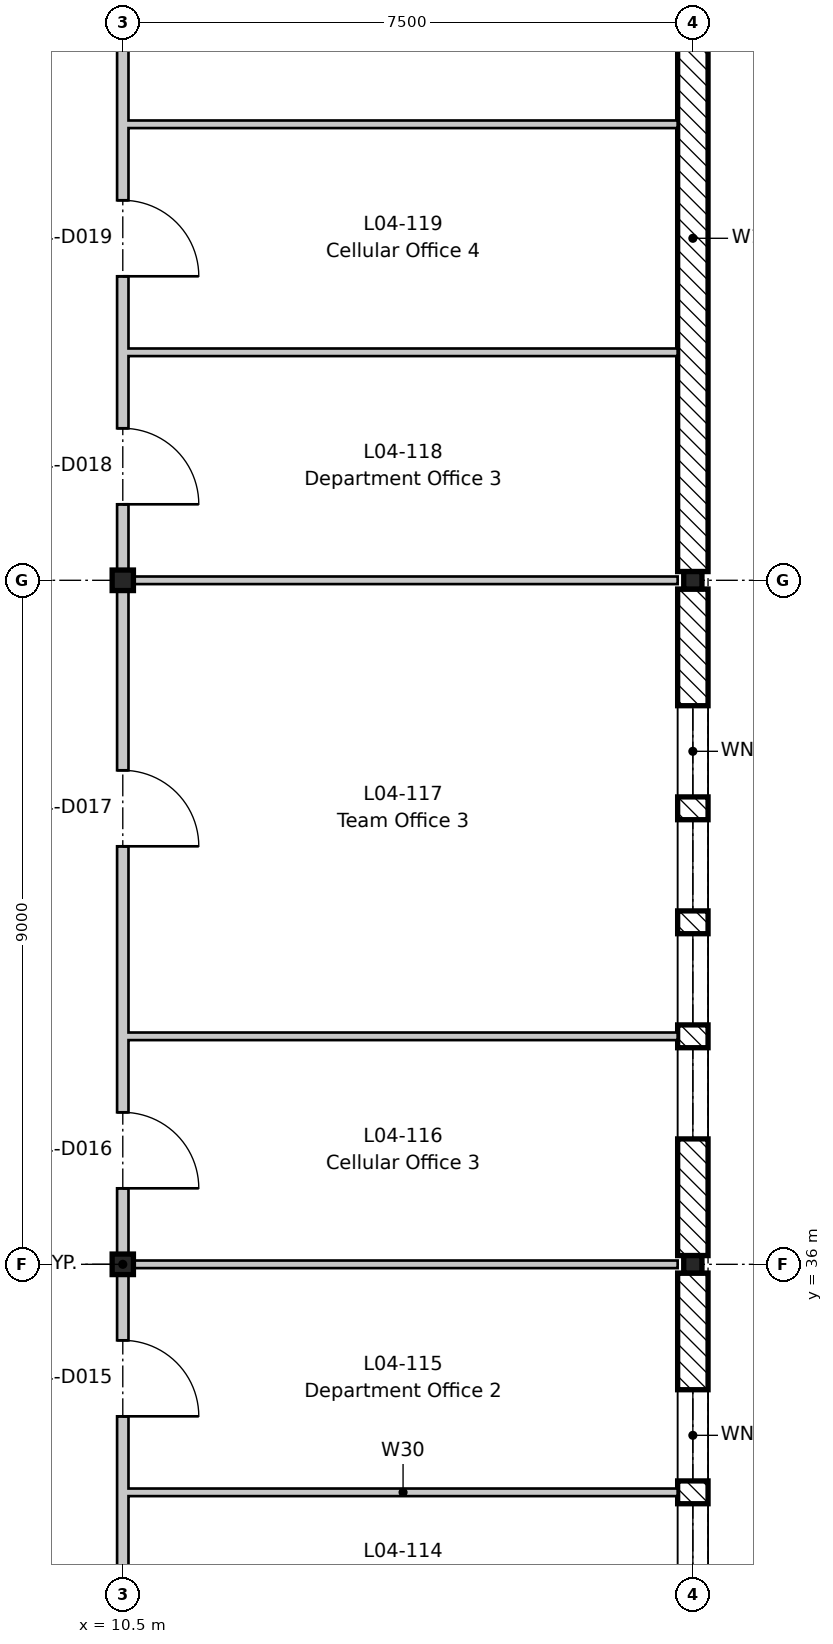
"""IFC4 building model, lengths in metres.
Left out: names, types, materials, properties, quantities, classifications, styles, units other than length and angle.
Written with IfcOpenShell. Run it as: python <this file> out.ifc"""

import sys

from ifc_helpers import new_model, si_unit, direction, frame, frame_2d, origin, origin_2d, place, context, subcontext, project, spatial, rectangle, i_section, extrude, element, fill, save


model = new_model("IFC4")
c1 = context("Model", 3, precision=1e-05, world=origin(), true_north=direction((0.0, 1.0)))
c2 = subcontext(c1, "Body", "Model", "MODEL_VIEW")
j1 = project(units=[si_unit("LENGTHUNIT", "METRE"), si_unit("PLANEANGLEUNIT", "RADIAN")], contexts=[c1])
p1 = place(None, origin())
s1 = spatial("IfcSite", under=j1, at=p1, CompositionType="ELEMENT")
p2 = place(p1, origin())
s2 = spatial("IfcBuilding", under=s1, at=p2, CompositionType="ELEMENT")
p3 = place(p2, frame((0.0, 0.0, 18.6)))
s3 = spatial("IfcBuildingStorey", under=s2, at=p3, CompositionType="ELEMENT", Elevation=18.6)
for number, where, z_axis, x_axis in (
    (1, (10.5, 36.0, -0.2), (0.0, 0.0, 1.0), (1.0, 0.0, 0.0)),
    (2, (10.5, 45.0, -0.2), (0.0, 0.0, 1.0), (1.0, 0.0, 0.0)),
):
    element("IfcColumn", number, at=place(p3, frame(where, z_axis=z_axis, x_axis=x_axis)), inside=s3, PredefinedType="COLUMN", context=c2, shape_type="SweptSolid", body=[
        extrude(i_section(OverallWidth=0.28, OverallDepth=0.27, WebThickness=0.008, FlangeThickness=0.013, FilletRadius=0.024, at=origin_2d()), origin(), (0.0, 0.0, 1.0), 4.2),
    ])
for number, where, z_axis, x_axis in (
    (3, (18.0, 36.0, -0.2), (0.0, 0.0, 1.0), (1.0, 0.0, 0.0)),
    (4, (18.0, 45.0, -0.2), (0.0, 0.0, 1.0), (1.0, 0.0, 0.0)),
):
    element("IfcColumn", number, at=place(p3, frame(where, z_axis=z_axis, x_axis=x_axis)), inside=s3, PredefinedType="COLUMN", context=c2, shape_type="SweptSolid", body=[
        extrude(i_section(OverallWidth=0.24, OverallDepth=0.23, WebThickness=0.008, FlangeThickness=0.012, FilletRadius=0.021, at=origin_2d()), origin(), (0.0, 0.0, 1.0), 4.2),
    ])
p4 = place(p3, frame((18.0, 35.885, 0.0), z_axis=(0.0, 0.0, 1.0), x_axis=(0.0, -1.0, 0.0)))
e5 = element("IfcWall", 5, at=p4, inside=s3, PredefinedType="STANDARD", context=c2, shape_type="SweptSolid", body=[
    extrude(rectangle(XDim=8.77, YDim=0.4, at=frame_2d((4.385, 0.0))), origin(), (0.0, 0.0, 1.0), 3.6),
])
p5 = place(p4, frame((6.035, 0.0, 0.6)))
e6 = element("IfcOpeningElement", 6, at=p5, cuts=e5, PredefinedType="OPENING", context=c2, shape_type="SweptSolid", body=[
    extrude(rectangle(XDim=1.2, YDim=2.7, at=frame_2d((0.6, 1.35))), frame((0.0, 0.21, 0.0), z_axis=(0.0, -1.0, 0.0), x_axis=(1.0, 0.0, 0.0)), (0.0, 0.0, 1.0), 0.42),
])
p6 = place(p4, frame((4.535, 0.0, 0.6)))
e7 = element("IfcOpeningElement", 7, at=p6, cuts=e5, PredefinedType="OPENING", context=c2, shape_type="SweptSolid", body=[
    extrude(rectangle(XDim=1.2, YDim=2.7, at=frame_2d((0.6, 1.35))), frame((0.0, 0.21, 0.0), z_axis=(0.0, -1.0, 0.0), x_axis=(1.0, 0.0, 0.0)), (0.0, 0.0, 1.0), 0.42),
])
p7 = place(p4, frame((3.035, 0.0, 0.6)))
e8 = element("IfcOpeningElement", 8, at=p7, cuts=e5, PredefinedType="OPENING", context=c2, shape_type="SweptSolid", body=[
    extrude(rectangle(XDim=1.2, YDim=2.7, at=frame_2d((0.6, 1.35))), frame((0.0, 0.21, 0.0), z_axis=(0.0, -1.0, 0.0), x_axis=(1.0, 0.0, 0.0)), (0.0, 0.0, 1.0), 0.42),
])
p8 = place(p4, frame((1.535, 0.0, 0.6)))
e9 = element("IfcOpeningElement", 9, at=p8, cuts=e5, PredefinedType="OPENING", context=c2, shape_type="SweptSolid", body=[
    extrude(rectangle(XDim=1.2, YDim=2.7, at=frame_2d((0.6, 1.35))), frame((0.0, 0.21, 0.0), z_axis=(0.0, -1.0, 0.0), x_axis=(1.0, 0.0, 0.0)), (0.0, 0.0, 1.0), 0.42),
])
p9 = place(p3, frame((18.0, 44.885, 0.0), z_axis=(0.0, 0.0, 1.0), x_axis=(0.0, -1.0, 0.0)))
e10 = element("IfcWall", 10, at=p9, inside=s3, PredefinedType="STANDARD", context=c2, shape_type="SweptSolid", body=[
    extrude(rectangle(XDim=8.77, YDim=0.4, at=frame_2d((4.385, 0.0))), origin(), (0.0, 0.0, 1.0), 3.6),
])
p10 = place(p9, frame((6.035, 0.0, 0.6)))
e11 = element("IfcOpeningElement", 11, at=p10, cuts=e10, PredefinedType="OPENING", context=c2, shape_type="SweptSolid", body=[
    extrude(rectangle(XDim=1.2, YDim=2.7, at=frame_2d((0.6, 1.35))), frame((0.0, 0.21, 0.0), z_axis=(0.0, -1.0, 0.0), x_axis=(1.0, 0.0, 0.0)), (0.0, 0.0, 1.0), 0.42),
])
p11 = place(p9, frame((4.535, 0.0, 0.6)))
e12 = element("IfcOpeningElement", 12, at=p11, cuts=e10, PredefinedType="OPENING", context=c2, shape_type="SweptSolid", body=[
    extrude(rectangle(XDim=1.2, YDim=2.7, at=frame_2d((0.6, 1.35))), frame((0.0, 0.21, 0.0), z_axis=(0.0, -1.0, 0.0), x_axis=(1.0, 0.0, 0.0)), (0.0, 0.0, 1.0), 0.42),
])
p12 = place(p9, frame((3.035, 0.0, 0.6)))
e13 = element("IfcOpeningElement", 13, at=p12, cuts=e10, PredefinedType="OPENING", context=c2, shape_type="SweptSolid", body=[
    extrude(rectangle(XDim=1.2, YDim=2.7, at=frame_2d((0.6, 1.35))), frame((0.0, 0.21, 0.0), z_axis=(0.0, -1.0, 0.0), x_axis=(1.0, 0.0, 0.0)), (0.0, 0.0, 1.0), 0.42),
])
p13 = place(p9, frame((1.535, 0.0, 0.6)))
e14 = element("IfcOpeningElement", 14, at=p13, cuts=e10, PredefinedType="OPENING", context=c2, shape_type="SweptSolid", body=[
    extrude(rectangle(XDim=1.2, YDim=2.7, at=frame_2d((0.6, 1.35))), frame((0.0, 0.21, 0.0), z_axis=(0.0, -1.0, 0.0), x_axis=(1.0, 0.0, 0.0)), (0.0, 0.0, 1.0), 0.42),
])
p14 = place(p3, frame((18.0, 53.885, 0.0), z_axis=(0.0, 0.0, 1.0), x_axis=(0.0, -1.0, 0.0)))
e15 = element("IfcWall", 15, at=p14, inside=s3, PredefinedType="STANDARD", context=c2, shape_type="SweptSolid", body=[
    extrude(rectangle(XDim=8.77, YDim=0.4, at=frame_2d((4.385, 0.0))), origin(), (0.0, 0.0, 1.0), 3.6),
])
p15 = place(p3, frame((10.575, 33.0, 0.0), z_axis=(0.0, 0.0, 1.0), x_axis=(1.0, 0.0, 0.0)))
e16 = element("IfcWall", 16, at=p15, inside=s3, PredefinedType="PARTITIONING", context=c2, shape_type="SweptSolid", body=[
    extrude(rectangle(XDim=7.225, YDim=0.1, at=frame_2d((3.613, 0.0))), origin(), (0.0, 0.0, 1.0), 4.0),
])
p16 = place(p3, frame((10.575, 36.0, 0.0), z_axis=(0.0, 0.0, 1.0), x_axis=(1.0, 0.0, 0.0)))
e17 = element("IfcWall", 17, at=p16, inside=s3, PredefinedType="PARTITIONING", context=c2, shape_type="SweptSolid", body=[
    extrude(rectangle(XDim=7.225, YDim=0.1, at=frame_2d((3.613, 0.0))), origin(), (0.0, 0.0, 1.0), 3.65),
])
p17 = place(p3, frame((10.575, 39.0, 0.0), z_axis=(0.0, 0.0, 1.0), x_axis=(1.0, 0.0, 0.0)))
e18 = element("IfcWall", 18, at=p17, inside=s3, PredefinedType="PARTITIONING", context=c2, shape_type="SweptSolid", body=[
    extrude(rectangle(XDim=7.225, YDim=0.1, at=frame_2d((3.613, 0.0))), origin(), (0.0, 0.0, 1.0), 4.0),
])
p18 = place(p3, frame((10.575, 45.0, 0.0), z_axis=(0.0, 0.0, 1.0), x_axis=(1.0, 0.0, 0.0)))
e19 = element("IfcWall", 19, at=p18, inside=s3, PredefinedType="PARTITIONING", context=c2, shape_type="SweptSolid", body=[
    extrude(rectangle(XDim=7.225, YDim=0.1, at=frame_2d((3.613, 0.0))), origin(), (0.0, 0.0, 1.0), 3.65),
])
for number, where, z_axis, x_axis in (
    (20, (10.575, 48.0, 0.0), (0.0, 0.0, 1.0), (1.0, 0.0, 0.0)),
    (21, (10.575, 51.0, 0.0), (0.0, 0.0, 1.0), (1.0, 0.0, 0.0)),
):
    element("IfcWall", number, at=place(p3, frame(where, z_axis=z_axis, x_axis=x_axis)), inside=s3, PredefinedType="PARTITIONING", context=c2, shape_type="SweptSolid", body=[
        extrude(rectangle(XDim=7.225, YDim=0.1, at=frame_2d((3.613, 0.0))), origin(), (0.0, 0.0, 1.0), 4.0),
    ])
p19 = place(p3, frame((10.5, -8.8, 0.0), z_axis=(0.0, 0.0, 1.0), x_axis=(0.0, 1.0, 0.0)))
e22 = element("IfcWall", 22, at=p19, inside=s3, PredefinedType="PARTITIONING", context=c2, shape_type="SweptSolid", body=[
    extrude(rectangle(XDim=79.3, YDim=0.15, at=frame_2d((39.65, 0.0))), origin(), (0.0, 0.0, 1.0), 3.48),
])
p20 = place(p19, frame((2.3, 0.0, 0.0)))
e23 = element("IfcOpeningElement", 23, at=p20, cuts=e22, PredefinedType="OPENING", context=c2, shape_type="SweptSolid", body=[
    extrude(rectangle(XDim=1.0, YDim=2.1, at=frame_2d((0.5, 1.05))), frame((0.0, 0.085, 0.0), z_axis=(0.0, -1.0, 0.0), x_axis=(1.0, 0.0, 0.0)), (0.0, 0.0, 1.0), 0.17),
])
p21 = place(p19, frame((9.55, 0.0, 0.0)))
e24 = element("IfcOpeningElement", 24, at=p21, cuts=e22, PredefinedType="OPENING", context=c2, shape_type="SweptSolid", body=[
    extrude(rectangle(XDim=1.0, YDim=2.1, at=frame_2d((0.5, 1.05))), frame((0.0, 0.085, 0.0), z_axis=(0.0, -1.0, 0.0), x_axis=(1.0, 0.0, 0.0)), (0.0, 0.0, 1.0), 0.17),
])
p22 = place(p19, frame((15.6, 0.0, 0.0)))
e25 = element("IfcOpeningElement", 25, at=p22, cuts=e22, PredefinedType="OPENING", context=c2, shape_type="SweptSolid", body=[
    extrude(rectangle(XDim=1.4, YDim=2.1, at=frame_2d((0.7, 1.05))), frame((0.0, 0.085, 0.0), z_axis=(0.0, -1.0, 0.0), x_axis=(1.0, 0.0, 0.0)), (0.0, 0.0, 1.0), 0.17),
])
p23 = place(p19, frame((21.8, 0.0, 0.0)))
e26 = element("IfcOpeningElement", 26, at=p23, cuts=e22, PredefinedType="OPENING", context=c2, shape_type="SweptSolid", body=[
    extrude(rectangle(XDim=1.0, YDim=2.1, at=frame_2d((0.5, 1.05))), frame((0.0, 0.085, 0.0), z_axis=(0.0, -1.0, 0.0), x_axis=(1.0, 0.0, 0.0)), (0.0, 0.0, 1.0), 0.17),
])
p24 = place(p19, frame((24.8, 0.0, 0.0)))
e27 = element("IfcOpeningElement", 27, at=p24, cuts=e22, PredefinedType="OPENING", context=c2, shape_type="SweptSolid", body=[
    extrude(rectangle(XDim=1.0, YDim=2.1, at=frame_2d((0.5, 1.05))), frame((0.0, 0.085, 0.0), z_axis=(0.0, -1.0, 0.0), x_axis=(1.0, 0.0, 0.0)), (0.0, 0.0, 1.0), 0.17),
])
p25 = place(p19, frame((30.6, 0.0, 0.0)))
e28 = element("IfcOpeningElement", 28, at=p25, cuts=e22, PredefinedType="OPENING", context=c2, shape_type="SweptSolid", body=[
    extrude(rectangle(XDim=1.4, YDim=2.1, at=frame_2d((0.7, 1.05))), frame((0.0, 0.085, 0.0), z_axis=(0.0, -1.0, 0.0), x_axis=(1.0, 0.0, 0.0)), (0.0, 0.0, 1.0), 0.17),
])
p26 = place(p19, frame((38.3, 0.0, 0.0)))
e29 = element("IfcOpeningElement", 29, at=p26, cuts=e22, PredefinedType="OPENING", context=c2, shape_type="SweptSolid", body=[
    extrude(rectangle(XDim=1.0, YDim=2.1, at=frame_2d((0.5, 1.05))), frame((0.0, 0.085, 0.0), z_axis=(0.0, -1.0, 0.0), x_axis=(1.0, 0.0, 0.0)), (0.0, 0.0, 1.0), 0.17),
])
p27 = place(p19, frame((42.8, 0.0, 0.0)))
e30 = element("IfcOpeningElement", 30, at=p27, cuts=e22, PredefinedType="OPENING", context=c2, shape_type="SweptSolid", body=[
    extrude(rectangle(XDim=1.0, YDim=2.1, at=frame_2d((0.5, 1.05))), frame((0.0, 0.085, 0.0), z_axis=(0.0, -1.0, 0.0), x_axis=(1.0, 0.0, 0.0)), (0.0, 0.0, 1.0), 0.17),
])
p28 = place(p19, frame((45.8, 0.0, 0.0)))
e31 = element("IfcOpeningElement", 31, at=p28, cuts=e22, PredefinedType="OPENING", context=c2, shape_type="SweptSolid", body=[
    extrude(rectangle(XDim=1.0, YDim=2.1, at=frame_2d((0.5, 1.05))), frame((0.0, 0.085, 0.0), z_axis=(0.0, -1.0, 0.0), x_axis=(1.0, 0.0, 0.0)), (0.0, 0.0, 1.0), 0.17),
])
p29 = place(p19, frame((50.3, 0.0, 0.0)))
e32 = element("IfcOpeningElement", 32, at=p29, cuts=e22, PredefinedType="OPENING", context=c2, shape_type="SweptSolid", body=[
    extrude(rectangle(XDim=1.0, YDim=2.1, at=frame_2d((0.5, 1.05))), frame((0.0, 0.085, 0.0), z_axis=(0.0, -1.0, 0.0), x_axis=(1.0, 0.0, 0.0)), (0.0, 0.0, 1.0), 0.17),
])
p30 = place(p19, frame((54.8, 0.0, 0.0)))
e33 = element("IfcOpeningElement", 33, at=p30, cuts=e22, PredefinedType="OPENING", context=c2, shape_type="SweptSolid", body=[
    extrude(rectangle(XDim=1.0, YDim=2.1, at=frame_2d((0.5, 1.05))), frame((0.0, 0.085, 0.0), z_axis=(0.0, -1.0, 0.0), x_axis=(1.0, 0.0, 0.0)), (0.0, 0.0, 1.0), 0.17),
])
p31 = place(p19, frame((57.8, 0.0, 0.0)))
e34 = element("IfcOpeningElement", 34, at=p31, cuts=e22, PredefinedType="OPENING", context=c2, shape_type="SweptSolid", body=[
    extrude(rectangle(XDim=1.0, YDim=2.1, at=frame_2d((0.5, 1.05))), frame((0.0, 0.085, 0.0), z_axis=(0.0, -1.0, 0.0), x_axis=(1.0, 0.0, 0.0)), (0.0, 0.0, 1.0), 0.17),
])
p32 = place(p19, frame((63.6, 0.0, 0.0)))
e35 = element("IfcOpeningElement", 35, at=p32, cuts=e22, PredefinedType="OPENING", context=c2, shape_type="SweptSolid", body=[
    extrude(rectangle(XDim=1.4, YDim=2.1, at=frame_2d((0.7, 1.05))), frame((0.0, 0.085, 0.0), z_axis=(0.0, -1.0, 0.0), x_axis=(1.0, 0.0, 0.0)), (0.0, 0.0, 1.0), 0.17),
])
p33 = place(p19, frame((69.8, 0.0, 0.0)))
e36 = element("IfcOpeningElement", 36, at=p33, cuts=e22, PredefinedType="OPENING", context=c2, shape_type="SweptSolid", body=[
    extrude(rectangle(XDim=1.0, YDim=2.1, at=frame_2d((0.5, 1.05))), frame((0.0, 0.085, 0.0), z_axis=(0.0, -1.0, 0.0), x_axis=(1.0, 0.0, 0.0)), (0.0, 0.0, 1.0), 0.17),
])
p34 = place(p19, frame((72.8, 0.0, 0.0)))
e37 = element("IfcOpeningElement", 37, at=p34, cuts=e22, PredefinedType="OPENING", context=c2, shape_type="SweptSolid", body=[
    extrude(rectangle(XDim=1.0, YDim=2.1, at=frame_2d((0.5, 1.05))), frame((0.0, 0.085, 0.0), z_axis=(0.0, -1.0, 0.0), x_axis=(1.0, 0.0, 0.0)), (0.0, 0.0, 1.0), 0.17),
])
p35 = place(p7, origin())
e38 = element("IfcWindow", 38, at=p35, inside=s3, PartitioningType="SINGLE_PANEL", PredefinedType="WINDOW", context=c2, shape_type="SweptSolid", body=[
    extrude(rectangle(XDim=1.2, YDim=2.7, at=frame_2d((0.6, 1.35))), frame((0.0, 0.03, 0.0), z_axis=(0.0, -1.0, 0.0), x_axis=(1.0, 0.0, 0.0)), (0.0, 0.0, 1.0), 0.06),
])
fill(e8, e38)
p36 = place(p8, origin())
e39 = element("IfcWindow", 39, at=p36, inside=s3, PartitioningType="SINGLE_PANEL", PredefinedType="WINDOW", context=c2, shape_type="SweptSolid", body=[
    extrude(rectangle(XDim=1.2, YDim=2.7, at=frame_2d((0.6, 1.35))), frame((0.0, 0.03, 0.0), z_axis=(0.0, -1.0, 0.0), x_axis=(1.0, 0.0, 0.0)), (0.0, 0.0, 1.0), 0.06),
])
fill(e9, e39)
p37 = place(p10, origin())
e40 = element("IfcWindow", 40, at=p37, inside=s3, PartitioningType="SINGLE_PANEL", PredefinedType="WINDOW", context=c2, shape_type="SweptSolid", body=[
    extrude(rectangle(XDim=1.2, YDim=2.7, at=frame_2d((0.6, 1.35))), frame((0.0, 0.03, 0.0), z_axis=(0.0, -1.0, 0.0), x_axis=(1.0, 0.0, 0.0)), (0.0, 0.0, 1.0), 0.06),
])
fill(e11, e40)
p38 = place(p11, origin())
e41 = element("IfcWindow", 41, at=p38, inside=s3, PartitioningType="SINGLE_PANEL", PredefinedType="WINDOW", context=c2, shape_type="SweptSolid", body=[
    extrude(rectangle(XDim=1.2, YDim=2.7, at=frame_2d((0.6, 1.35))), frame((0.0, 0.03, 0.0), z_axis=(0.0, -1.0, 0.0), x_axis=(1.0, 0.0, 0.0)), (0.0, 0.0, 1.0), 0.06),
])
fill(e12, e41)
p39 = place(p12, origin())
e42 = element("IfcWindow", 42, at=p39, inside=s3, PartitioningType="SINGLE_PANEL", PredefinedType="WINDOW", context=c2, shape_type="SweptSolid", body=[
    extrude(rectangle(XDim=1.2, YDim=2.7, at=frame_2d((0.6, 1.35))), frame((0.0, 0.03, 0.0), z_axis=(0.0, -1.0, 0.0), x_axis=(1.0, 0.0, 0.0)), (0.0, 0.0, 1.0), 0.06),
])
fill(e13, e42)
p40 = place(p13, origin())
e43 = element("IfcWindow", 43, at=p40, inside=s3, PartitioningType="SINGLE_PANEL", PredefinedType="WINDOW", context=c2, shape_type="SweptSolid", body=[
    extrude(rectangle(XDim=1.2, YDim=2.7, at=frame_2d((0.6, 1.35))), frame((0.0, 0.03, 0.0), z_axis=(0.0, -1.0, 0.0), x_axis=(1.0, 0.0, 0.0)), (0.0, 0.0, 1.0), 0.06),
])
fill(e14, e43)
p41 = place(p27, frame((1.0, 0.0, 0.0), z_axis=(0.0, 0.0, 1.0), x_axis=(-1.0, 0.0, 0.0)))
e44 = element("IfcDoor", 44, at=p41, inside=s3, OperationType="SINGLE_SWING_RIGHT", PredefinedType="DOOR", context=c2, shape_type="SweptSolid", body=[
    extrude(rectangle(XDim=1.0, YDim=2.1, at=frame_2d((0.5, 1.05))), frame((0.0, 0.025, 0.0), z_axis=(0.0, -1.0, 0.0), x_axis=(1.0, 0.0, 0.0)), (0.0, 0.0, 1.0), 0.05),
])
fill(e30, e44)
p42 = place(p28, frame((1.0, 0.0, 0.0), z_axis=(0.0, 0.0, 1.0), x_axis=(-1.0, 0.0, 0.0)))
e45 = element("IfcDoor", 45, at=p42, inside=s3, OperationType="SINGLE_SWING_RIGHT", PredefinedType="DOOR", context=c2, shape_type="SweptSolid", body=[
    extrude(rectangle(XDim=1.0, YDim=2.1, at=frame_2d((0.5, 1.05))), frame((0.0, 0.025, 0.0), z_axis=(0.0, -1.0, 0.0), x_axis=(1.0, 0.0, 0.0)), (0.0, 0.0, 1.0), 0.05),
])
fill(e31, e45)
p43 = place(p29, frame((1.0, 0.0, 0.0), z_axis=(0.0, 0.0, 1.0), x_axis=(-1.0, 0.0, 0.0)))
e46 = element("IfcDoor", 46, at=p43, inside=s3, OperationType="SINGLE_SWING_RIGHT", PredefinedType="DOOR", context=c2, shape_type="SweptSolid", body=[
    extrude(rectangle(XDim=1.0, YDim=2.1, at=frame_2d((0.5, 1.05))), frame((0.0, 0.025, 0.0), z_axis=(0.0, -1.0, 0.0), x_axis=(1.0, 0.0, 0.0)), (0.0, 0.0, 1.0), 0.05),
])
fill(e32, e46)
p44 = place(p30, frame((1.0, 0.0, 0.0), z_axis=(0.0, 0.0, 1.0), x_axis=(-1.0, 0.0, 0.0)))
e47 = element("IfcDoor", 47, at=p44, inside=s3, OperationType="SINGLE_SWING_RIGHT", PredefinedType="DOOR", context=c2, shape_type="SweptSolid", body=[
    extrude(rectangle(XDim=1.0, YDim=2.1, at=frame_2d((0.5, 1.05))), frame((0.0, 0.025, 0.0), z_axis=(0.0, -1.0, 0.0), x_axis=(1.0, 0.0, 0.0)), (0.0, 0.0, 1.0), 0.05),
])
fill(e33, e47)
p45 = place(p31, frame((1.0, 0.0, 0.0), z_axis=(0.0, 0.0, 1.0), x_axis=(-1.0, 0.0, 0.0)))
e48 = element("IfcDoor", 48, at=p45, inside=s3, OperationType="SINGLE_SWING_RIGHT", PredefinedType="DOOR", context=c2, shape_type="SweptSolid", body=[
    extrude(rectangle(XDim=1.0, YDim=2.1, at=frame_2d((0.5, 1.05))), frame((0.0, 0.025, 0.0), z_axis=(0.0, -1.0, 0.0), x_axis=(1.0, 0.0, 0.0)), (0.0, 0.0, 1.0), 0.05),
])
fill(e34, e48)
save(model, sys.argv[1])
